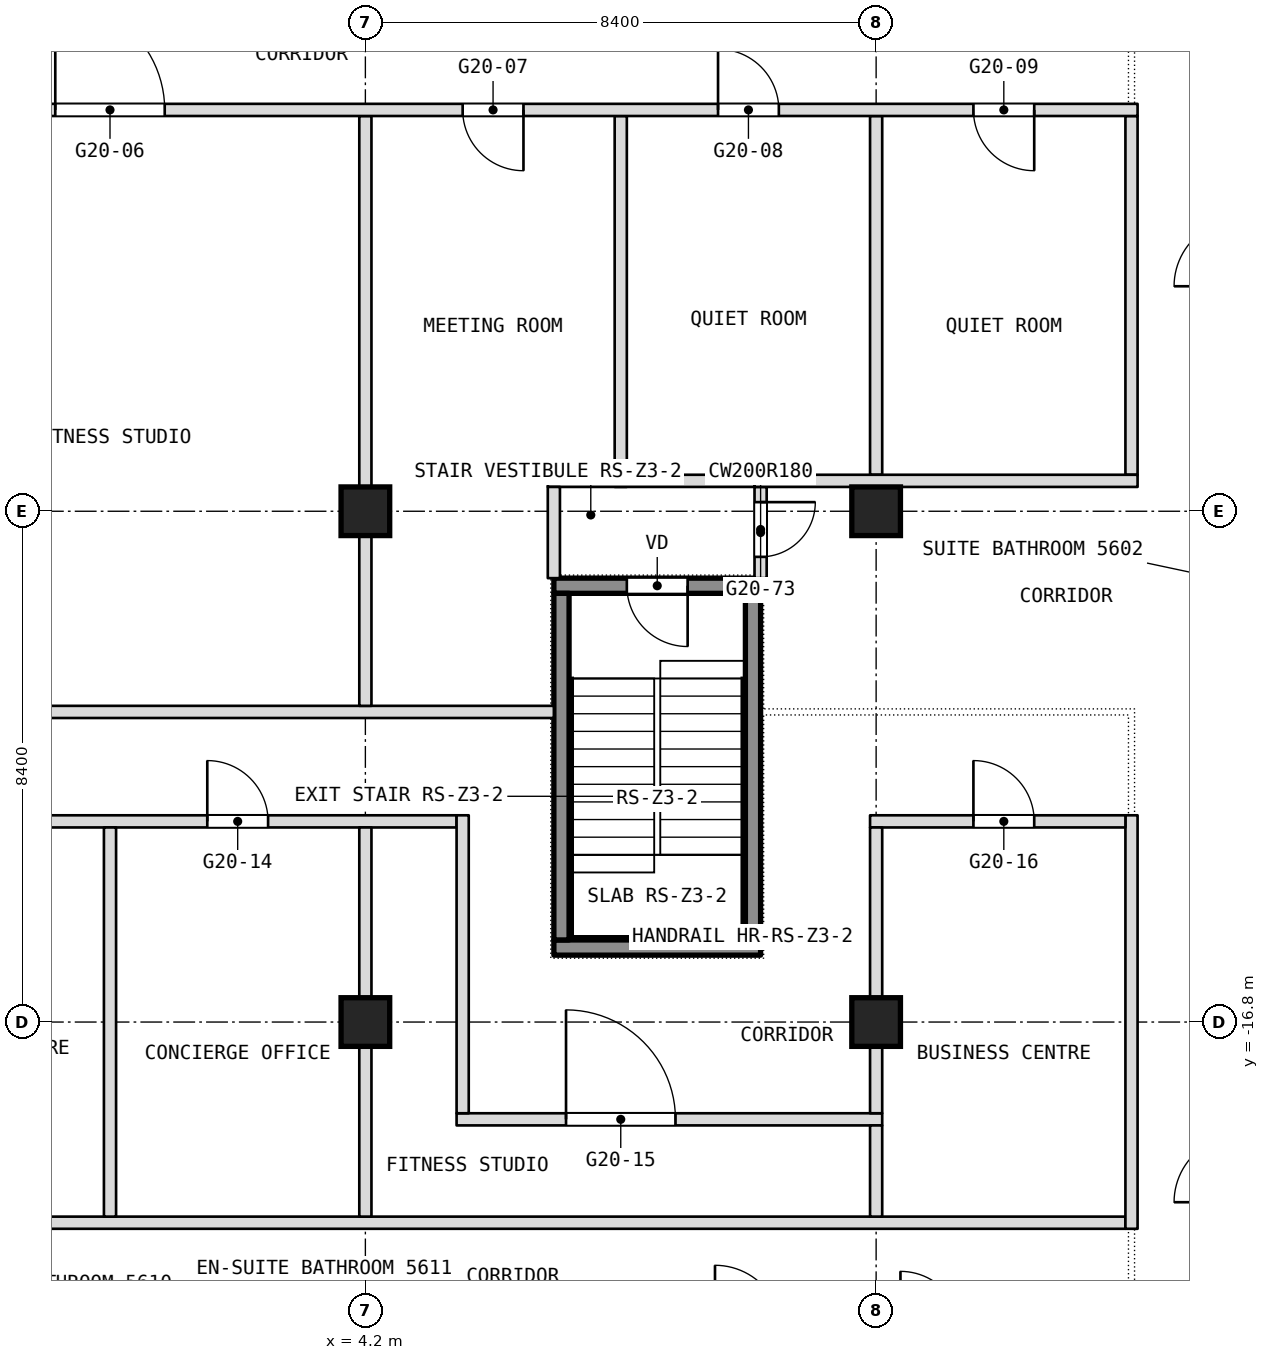
"""IFC4 building model, lengths in metres.
Left out: names, types, materials, properties, quantities, classifications, styles, units other than length and angle.
Written with IfcOpenShell. Run it as: python <this file> out.ifc"""

import sys

from ifc_helpers import new_model, si_unit, direction, frame, frame_2d, origin, origin_2d, place, context, subcontext, project, spatial, rectangle, extrude, element, fill, save


model = new_model("IFC4")
c1 = context("Model", 3, precision=1e-05, world=origin(), true_north=direction((0.0, 1.0)))
c2 = subcontext(c1, "Body", "Model", "MODEL_VIEW")
j1 = project(units=[si_unit("LENGTHUNIT", "METRE"), si_unit("PLANEANGLEUNIT", "RADIAN")], contexts=[c1])
p1 = place(None, origin())
s1 = spatial("IfcSite", under=j1, at=p1, CompositionType="ELEMENT")
p2 = place(p1, origin())
s2 = spatial("IfcBuilding", under=s1, at=p2, CompositionType="ELEMENT")
p3 = place(p2, frame((0.0, 0.0, 238.1)))
s3 = spatial("IfcBuildingStorey", under=s2, at=p3, CompositionType="ELEMENT", Elevation=238.1)
for number, where, z_axis, x_axis in (
    (1, (4.2, -16.8, 0.0), (0.0, 0.0, 1.0), (1.0, 0.0, 0.0)),
    (2, (4.2, -8.4, 0.0), (0.0, 0.0, 1.0), (1.0, 0.0, 0.0)),
    (3, (12.6, -16.8, 0.0), (0.0, 0.0, 1.0), (1.0, 0.0, 0.0)),
    (4, (12.6, -8.4, 0.0), (0.0, 0.0, 1.0), (1.0, 0.0, 0.0)),
):
    element("IfcColumn", number, at=place(p3, frame(where, z_axis=z_axis, x_axis=x_axis)), inside=s3, PredefinedType="COLUMN", context=c2, shape_type="SweptSolid", body=[
        extrude(rectangle(XDim=0.8, YDim=0.8, at=origin_2d()), origin(), (0.0, 0.0, 1.0), 3.6),
    ])
p4 = place(p3, frame((-16.7, -20.1, 0.0), z_axis=(0.0, 0.0, 1.0), x_axis=(1.0, 0.0, 0.0)))
e5 = element("IfcWall", 5, at=p4, inside=s3, PredefinedType="PARTITIONING", context=c2, shape_type="SweptSolid", body=[
    extrude(rectangle(XDim=33.4, YDim=0.2, at=frame_2d((16.7, 0.0))), origin(), (0.0, 0.0, 1.0), 3.34),
])
p5 = place(p3, frame((5.7, -18.4, 0.0), z_axis=(0.0, 0.0, 1.0), x_axis=(1.0, 0.0, 0.0)))
e6 = element("IfcWall", 6, at=p5, inside=s3, PredefinedType="PARTITIONING", context=c2, shape_type="SweptSolid", body=[
    extrude(rectangle(XDim=7.0, YDim=0.2, at=frame_2d((3.5, 0.0))), origin(), (0.0, 0.0, 1.0), 3.34),
])
p6 = place(p5, frame((1.8, 0.0, 0.0)))
e7 = element("IfcOpeningElement", 7, at=p6, cuts=e6, PredefinedType="OPENING", context=c2, shape_type="SweptSolid", body=[
    extrude(rectangle(XDim=1.8, YDim=2.1, at=frame_2d((0.9, 1.05))), frame((0.0, 0.1, 0.0), z_axis=(0.0, -1.0, 0.0), x_axis=(1.0, 0.0, 0.0)), (0.0, 0.0, 1.0), 0.2),
])
p7 = place(p3, frame((16.8, -20.2, 0.0), z_axis=(0.0, 0.0, 1.0), x_axis=(0.0, 1.0, 0.0)))
e8 = element("IfcWall", 8, at=p7, inside=s3, PredefinedType="PARTITIONING", context=c2, shape_type="SweptSolid", body=[
    extrude(rectangle(XDim=6.8, YDim=0.2, at=frame_2d((3.4, 0.0))), origin(), (0.0, 0.0, 1.0), 3.34),
])
p8 = place(p3, frame((16.8, -7.8, 0.0), z_axis=(0.0, 0.0, 1.0), x_axis=(0.0, 1.0, 0.0)))
e9 = element("IfcWall", 9, at=p8, inside=s3, PredefinedType="PARTITIONING", context=c2, shape_type="SweptSolid", body=[
    extrude(rectangle(XDim=5.9, YDim=0.2, at=frame_2d((2.95, 0.0))), origin(), (0.0, 0.0, 1.0), 3.34),
])
p9 = place(p3, frame((-5.9, -13.5, 0.0), z_axis=(0.0, 0.0, 1.0), x_axis=(1.0, 0.0, 0.0)))
e10 = element("IfcWall", 10, at=p9, inside=s3, PredefinedType="PARTITIONING", context=c2, shape_type="SweptSolid", body=[
    extrude(rectangle(XDim=11.6, YDim=0.2, at=frame_2d((5.8, 0.0))), origin(), (0.0, 0.0, 1.0), 3.34),
])
p10 = place(p9, frame((3.3, 0.0, 0.0)))
e11 = element("IfcOpeningElement", 11, at=p10, cuts=e10, PredefinedType="OPENING", context=c2, shape_type="SweptSolid", body=[
    extrude(rectangle(XDim=1.0, YDim=2.1, at=frame_2d((0.5, 1.05))), frame((0.0, 0.1, 0.0), z_axis=(0.0, -1.0, 0.0), x_axis=(1.0, 0.0, 0.0)), (0.0, 0.0, 1.0), 0.2),
])
p11 = place(p9, frame((7.5, 0.0, 0.0)))
e12 = element("IfcOpeningElement", 12, at=p11, cuts=e10, PredefinedType="OPENING", context=c2, shape_type="SweptSolid", body=[
    extrude(rectangle(XDim=1.0, YDim=2.1, at=frame_2d((0.5, 1.05))), frame((0.0, 0.1, 0.0), z_axis=(0.0, -1.0, 0.0), x_axis=(1.0, 0.0, 0.0)), (0.0, 0.0, 1.0), 0.2),
])
p12 = place(p3, frame((12.5, -13.5, 0.0), z_axis=(0.0, 0.0, 1.0), x_axis=(1.0, 0.0, 0.0)))
e13 = element("IfcWall", 13, at=p12, inside=s3, PredefinedType="PARTITIONING", context=c2, shape_type="SweptSolid", body=[
    extrude(rectangle(XDim=4.2, YDim=0.2, at=frame_2d((2.1, 0.0))), origin(), (0.0, 0.0, 1.0), 3.34),
])
p13 = place(p12, frame((1.7, 0.0, 0.0)))
e14 = element("IfcOpeningElement", 14, at=p13, cuts=e13, PredefinedType="OPENING", context=c2, shape_type="SweptSolid", body=[
    extrude(rectangle(XDim=1.0, YDim=2.1, at=frame_2d((0.5, 1.05))), frame((0.0, 0.1, 0.0), z_axis=(0.0, -1.0, 0.0), x_axis=(1.0, 0.0, 0.0)), (0.0, 0.0, 1.0), 0.2),
])
p14 = place(p3, frame((12.6, -20.0, 0.0), z_axis=(0.0, 0.0, 1.0), x_axis=(0.0, 1.0, 0.0)))
e15 = element("IfcWall", 15, at=p14, inside=s3, PredefinedType="PARTITIONING", context=c2, shape_type="SweptSolid", body=[
    extrude(rectangle(XDim=1.5, YDim=0.2, at=frame_2d((0.75, 0.0))), origin(), (0.0, 0.0, 1.0), 3.34),
])
p15 = place(p3, frame((12.6, -7.8, 0.0), z_axis=(0.0, 0.0, 1.0), x_axis=(0.0, 1.0, 0.0)))
e16 = element("IfcWall", 16, at=p15, inside=s3, PredefinedType="PARTITIONING", context=c2, shape_type="SweptSolid", body=[
    extrude(rectangle(XDim=5.9, YDim=0.2, at=frame_2d((2.95, 0.0))), origin(), (0.0, 0.0, 1.0), 3.34),
])
p16 = place(p3, frame((12.6, -18.3, 0.0), z_axis=(0.0, 0.0, 1.0), x_axis=(0.0, 1.0, 0.0)))
e17 = element("IfcWall", 17, at=p16, inside=s3, PredefinedType="PARTITIONING", context=c2, shape_type="SweptSolid", body=[
    extrude(rectangle(XDim=4.7, YDim=0.2, at=frame_2d((2.35, 0.0))), origin(), (0.0, 0.0, 1.0), 3.34),
])
p17 = place(p3, frame((-7.3, -11.7, 0.0), z_axis=(0.0, 0.0, 1.0), x_axis=(1.0, 0.0, 0.0)))
e18 = element("IfcWall", 18, at=p17, inside=s3, PredefinedType="PARTITIONING", context=c2, shape_type="SweptSolid", body=[
    extrude(rectangle(XDim=14.6, YDim=0.2, at=frame_2d((7.3, 0.0))), origin(), (0.0, 0.0, 1.0), 3.34),
])
p18 = place(p3, frame((10.7, -9.5, 0.0), z_axis=(0.0, 0.0, 1.0), x_axis=(0.0, 1.0, 0.0)))
e19 = element("IfcWall", 19, at=p18, inside=s3, PredefinedType="PARTITIONING", context=c2, shape_type="SweptSolid", body=[
    extrude(rectangle(XDim=1.5, YDim=0.2, at=frame_2d((0.75, 0.0))), origin(), (0.0, 0.0, 1.0), 3.34),
])
p19 = place(p18, frame((0.35, 0.0, 0.0)))
e20 = element("IfcOpeningElement", 20, at=p19, cuts=e19, PredefinedType="OPENING", context=c2, shape_type="SweptSolid", body=[
    extrude(rectangle(XDim=0.9, YDim=2.1, at=frame_2d((0.45, 1.05))), frame((0.0, 0.1, 0.0), z_axis=(0.0, -1.0, 0.0), x_axis=(1.0, 0.0, 0.0)), (0.0, 0.0, 1.0), 0.2),
])
p20 = place(p3, frame((8.4, -8.0, 0.0), z_axis=(0.0, 0.0, 1.0), x_axis=(0.0, 1.0, 0.0)))
e21 = element("IfcWall", 21, at=p20, inside=s3, PredefinedType="PARTITIONING", context=c2, shape_type="SweptSolid", body=[
    extrude(rectangle(XDim=6.1, YDim=0.2, at=frame_2d((3.05, 0.0))), origin(), (0.0, 0.0, 1.0), 3.34),
])
p21 = place(p3, frame((10.6, -7.9, 0.0), z_axis=(0.0, 0.0, 1.0), x_axis=(1.0, 0.0, 0.0)))
e22 = element("IfcWall", 22, at=p21, inside=s3, PredefinedType="PARTITIONING", context=c2, shape_type="SweptSolid", body=[
    extrude(rectangle(XDim=6.3, YDim=0.2, at=frame_2d((3.15, 0.0))), origin(), (0.0, 0.0, 1.0), 3.34),
])
p22 = place(p3, frame((7.2, -7.9, 0.0), z_axis=(0.0, 0.0, 1.0), x_axis=(1.0, 0.0, 0.0)))
e23 = element("IfcWall", 23, at=p22, inside=s3, PredefinedType="PARTITIONING", context=c2, shape_type="SweptSolid", body=[
    extrude(rectangle(XDim=3.4, YDim=0.2, at=frame_2d((1.7, 0.0))), origin(), (0.0, 0.0, 1.0), 3.34),
])
p23 = place(p3, frame((7.3, -9.5, 0.0), z_axis=(0.0, 0.0, 1.0), x_axis=(0.0, 1.0, 0.0)))
e24 = element("IfcWall", 24, at=p23, inside=s3, PredefinedType="PARTITIONING", context=c2, shape_type="SweptSolid", body=[
    extrude(rectangle(XDim=1.5, YDim=0.2, at=frame_2d((0.75, 0.0))), origin(), (0.0, 0.0, 1.0), 3.34),
])
p24 = place(p3, frame((5.8, -18.3, 0.0), z_axis=(0.0, 0.0, 1.0), x_axis=(0.0, 1.0, 0.0)))
e25 = element("IfcWall", 25, at=p24, inside=s3, PredefinedType="PARTITIONING", context=c2, shape_type="SweptSolid", body=[
    extrude(rectangle(XDim=4.9, YDim=0.2, at=frame_2d((2.45, 0.0))), origin(), (0.0, 0.0, 1.0), 3.34),
])
p25 = place(p3, frame((4.2, -20.0, 0.0), z_axis=(0.0, 0.0, 1.0), x_axis=(0.0, 1.0, 0.0)))
e26 = element("IfcWall", 26, at=p25, inside=s3, PredefinedType="PARTITIONING", context=c2, shape_type="SweptSolid", body=[
    extrude(rectangle(XDim=6.4, YDim=0.2, at=frame_2d((3.2, 0.0))), origin(), (0.0, 0.0, 1.0), 3.34),
])
p26 = place(p3, frame((4.2, -11.6, 0.0), z_axis=(0.0, 0.0, 1.0), x_axis=(0.0, 1.0, 0.0)))
e27 = element("IfcWall", 27, at=p26, inside=s3, PredefinedType="PARTITIONING", context=c2, shape_type="SweptSolid", body=[
    extrude(rectangle(XDim=9.7, YDim=0.2, at=frame_2d((4.85, 0.0))), origin(), (0.0, 0.0, 1.0), 3.34),
])
p27 = place(p3, frame((-16.9, -1.8, 0.0), z_axis=(0.0, 0.0, 1.0), x_axis=(1.0, 0.0, 0.0)))
e28 = element("IfcWall", 28, at=p27, inside=s3, PredefinedType="PARTITIONING", context=c2, shape_type="SweptSolid", body=[
    extrude(rectangle(XDim=33.8, YDim=0.2, at=frame_2d((16.9, 0.0))), origin(), (0.0, 0.0, 1.0), 3.34),
])
p28 = place(p27, frame((1.7, 0.0, 0.0)))
e29 = element("IfcOpeningElement", 29, at=p28, cuts=e28, PredefinedType="OPENING", context=c2, shape_type="SweptSolid", body=[
    extrude(rectangle(XDim=1.0, YDim=2.1, at=frame_2d((0.5, 1.05))), frame((0.0, 0.1, 0.0), z_axis=(0.0, -1.0, 0.0), x_axis=(1.0, 0.0, 0.0)), (0.0, 0.0, 1.0), 0.2),
])
p29 = place(p27, frame((5.9, 0.0, 0.0)))
e30 = element("IfcOpeningElement", 30, at=p29, cuts=e28, PredefinedType="OPENING", context=c2, shape_type="SweptSolid", body=[
    extrude(rectangle(XDim=1.0, YDim=2.1, at=frame_2d((0.5, 1.05))), frame((0.0, 0.1, 0.0), z_axis=(0.0, -1.0, 0.0), x_axis=(1.0, 0.0, 0.0)), (0.0, 0.0, 1.0), 0.2),
])
p30 = place(p27, frame((10.1, 0.0, 0.0)))
e31 = element("IfcOpeningElement", 31, at=p30, cuts=e28, PredefinedType="OPENING", context=c2, shape_type="SweptSolid", body=[
    extrude(rectangle(XDim=1.0, YDim=2.1, at=frame_2d((0.5, 1.05))), frame((0.0, 0.1, 0.0), z_axis=(0.0, -1.0, 0.0), x_axis=(1.0, 0.0, 0.0)), (0.0, 0.0, 1.0), 0.2),
])
p31 = place(p27, frame((16.0, 0.0, 0.0)))
e32 = element("IfcOpeningElement", 32, at=p31, cuts=e28, PredefinedType="OPENING", context=c2, shape_type="SweptSolid", body=[
    extrude(rectangle(XDim=1.8, YDim=2.1, at=frame_2d((0.9, 1.05))), frame((0.0, 0.1, 0.0), z_axis=(0.0, -1.0, 0.0), x_axis=(1.0, 0.0, 0.0)), (0.0, 0.0, 1.0), 0.2),
])
p32 = place(p27, frame((22.7, 0.0, 0.0)))
e33 = element("IfcOpeningElement", 33, at=p32, cuts=e28, PredefinedType="OPENING", context=c2, shape_type="SweptSolid", body=[
    extrude(rectangle(XDim=1.0, YDim=2.1, at=frame_2d((0.5, 1.05))), frame((0.0, 0.1, 0.0), z_axis=(0.0, -1.0, 0.0), x_axis=(1.0, 0.0, 0.0)), (0.0, 0.0, 1.0), 0.2),
])
p33 = place(p27, frame((26.9, 0.0, 0.0)))
e34 = element("IfcOpeningElement", 34, at=p33, cuts=e28, PredefinedType="OPENING", context=c2, shape_type="SweptSolid", body=[
    extrude(rectangle(XDim=1.0, YDim=2.1, at=frame_2d((0.5, 1.05))), frame((0.0, 0.1, 0.0), z_axis=(0.0, -1.0, 0.0), x_axis=(1.0, 0.0, 0.0)), (0.0, 0.0, 1.0), 0.2),
])
p34 = place(p27, frame((31.1, 0.0, 0.0)))
e35 = element("IfcOpeningElement", 35, at=p34, cuts=e28, PredefinedType="OPENING", context=c2, shape_type="SweptSolid", body=[
    extrude(rectangle(XDim=1.0, YDim=2.1, at=frame_2d((0.5, 1.05))), frame((0.0, 0.1, 0.0), z_axis=(0.0, -1.0, 0.0), x_axis=(1.0, 0.0, 0.0)), (0.0, 0.0, 1.0), 0.2),
])
p35 = place(p3, frame((0.0, -20.0, 0.0), z_axis=(0.0, 0.0, 1.0), x_axis=(0.0, 1.0, 0.0)))
e36 = element("IfcWall", 36, at=p35, inside=s3, PredefinedType="PARTITIONING", context=c2, shape_type="SweptSolid", body=[
    extrude(rectangle(XDim=6.4, YDim=0.2, at=frame_2d((3.2, 0.0))), origin(), (0.0, 0.0, 1.0), 3.34),
])
p36 = place(p3, frame((7.3, -15.575, 0.1), z_axis=(0.0, 0.0, 1.0), x_axis=(1.0, 0.0, 0.0)))
e37 = element("IfcWall", 37, at=p36, inside=s3, PredefinedType="SHEAR", context=c2, shape_type="SweptSolid", body=[
    extrude(rectangle(XDim=3.4, YDim=0.25, at=frame_2d((1.7, 0.0))), origin(), (0.0, 0.0, 1.0), 3.6),
])
p37 = place(p3, frame((7.3, -9.625, 0.1), z_axis=(0.0, 0.0, 1.0), x_axis=(1.0, 0.0, 0.0)))
e38 = element("IfcWall", 38, at=p37, inside=s3, PredefinedType="SHEAR", context=c2, shape_type="SweptSolid", body=[
    extrude(rectangle(XDim=3.4, YDim=0.25, at=frame_2d((1.7, 0.0))), origin(), (0.0, 0.0, 1.0), 3.6),
])
p38 = place(p37, frame((1.2, 0.0, 0.0)))
e39 = element("IfcOpeningElement", 39, at=p38, cuts=e38, PredefinedType="OPENING", context=c2, shape_type="SweptSolid", body=[
    extrude(rectangle(XDim=1.0, YDim=2.1, at=frame_2d((0.5, 1.05))), frame((0.0, 0.125, 0.0), z_axis=(0.0, -1.0, 0.0), x_axis=(1.0, 0.0, 0.0)), (0.0, 0.0, 1.0), 0.25),
])
for number, where, z_axis, x_axis in (
    (40, (7.425, -15.45, 0.1), (0.0, 0.0, 1.0), (0.0, 1.0, 0.0)),
    (41, (10.575, -15.45, 0.1), (0.0, 0.0, 1.0), (0.0, 1.0, 0.0)),
):
    element("IfcWall", number, at=place(p3, frame(where, z_axis=z_axis, x_axis=x_axis)), inside=s3, PredefinedType="SHEAR", context=c2, shape_type="SweptSolid", body=[
        extrude(rectangle(XDim=5.7, YDim=0.25, at=frame_2d((2.85, 0.0))), origin(), (0.0, 0.0, 1.0), 3.6),
    ])
p39 = place(p6, origin())
e42 = element("IfcDoor", 42, at=p39, inside=s3, OperationType="DOUBLE_DOOR_SINGLE_SWING", PredefinedType="DOOR", context=c2, shape_type="SweptSolid", body=[
    extrude(rectangle(XDim=1.8, YDim=2.1, at=frame_2d((0.9, 1.05))), frame((0.0, 0.025, 0.0), z_axis=(0.0, -1.0, 0.0), x_axis=(1.0, 0.0, 0.0)), (0.0, 0.0, 1.0), 0.05),
])
fill(e7, e42)
p40 = place(p11, origin())
e43 = element("IfcDoor", 43, at=p40, inside=s3, OperationType="SINGLE_SWING_RIGHT", PredefinedType="DOOR", context=c2, shape_type="SweptSolid", body=[
    extrude(rectangle(XDim=1.0, YDim=2.1, at=frame_2d((0.5, 1.05))), frame((0.0, 0.025, 0.0), z_axis=(0.0, -1.0, 0.0), x_axis=(1.0, 0.0, 0.0)), (0.0, 0.0, 1.0), 0.05),
])
fill(e12, e43)
p41 = place(p13, origin())
e44 = element("IfcDoor", 44, at=p41, inside=s3, OperationType="SINGLE_SWING_RIGHT", PredefinedType="DOOR", context=c2, shape_type="SweptSolid", body=[
    extrude(rectangle(XDim=1.0, YDim=2.1, at=frame_2d((0.5, 1.05))), frame((0.0, 0.025, 0.0), z_axis=(0.0, -1.0, 0.0), x_axis=(1.0, 0.0, 0.0)), (0.0, 0.0, 1.0), 0.05),
])
fill(e14, e44)
p42 = place(p19, origin())
e45 = element("IfcDoor", 45, at=p42, inside=s3, OperationType="SINGLE_SWING_RIGHT", PredefinedType="DOOR", context=c2, shape_type="SweptSolid", body=[
    extrude(rectangle(XDim=0.9, YDim=2.1, at=frame_2d((0.45, 1.05))), frame((0.0, 0.025, 0.0), z_axis=(0.0, -1.0, 0.0), x_axis=(1.0, 0.0, 0.0)), (0.0, 0.0, 1.0), 0.05),
])
fill(e20, e45)
p43 = place(p31, origin())
e46 = element("IfcDoor", 46, at=p43, inside=s3, OperationType="DOUBLE_DOOR_SINGLE_SWING", PredefinedType="DOOR", context=c2, shape_type="SweptSolid", body=[
    extrude(rectangle(XDim=1.8, YDim=2.1, at=frame_2d((0.9, 1.05))), frame((0.0, 0.025, 0.0), z_axis=(0.0, -1.0, 0.0), x_axis=(1.0, 0.0, 0.0)), (0.0, 0.0, 1.0), 0.05),
])
fill(e32, e46)
p44 = place(p32, origin())
e47 = element("IfcDoor", 47, at=p44, inside=s3, OperationType="SINGLE_SWING_RIGHT", PredefinedType="DOOR", context=c2, shape_type="SweptSolid", body=[
    extrude(rectangle(XDim=1.0, YDim=2.1, at=frame_2d((0.5, 1.05))), frame((0.0, 0.025, 0.0), z_axis=(0.0, -1.0, 0.0), x_axis=(1.0, 0.0, 0.0)), (0.0, 0.0, 1.0), 0.05),
])
fill(e33, e47)
p45 = place(p33, origin())
e48 = element("IfcDoor", 48, at=p45, inside=s3, OperationType="SINGLE_SWING_LEFT", PredefinedType="DOOR", context=c2, shape_type="SweptSolid", body=[
    extrude(rectangle(XDim=1.0, YDim=2.1, at=frame_2d((0.5, 1.05))), frame((0.0, 0.025, 0.0), z_axis=(0.0, -1.0, 0.0), x_axis=(1.0, 0.0, 0.0)), (0.0, 0.0, 1.0), 0.05),
])
fill(e34, e48)
p46 = place(p34, origin())
e49 = element("IfcDoor", 49, at=p46, inside=s3, OperationType="SINGLE_SWING_RIGHT", PredefinedType="DOOR", context=c2, shape_type="SweptSolid", body=[
    extrude(rectangle(XDim=1.0, YDim=2.1, at=frame_2d((0.5, 1.05))), frame((0.0, 0.025, 0.0), z_axis=(0.0, -1.0, 0.0), x_axis=(1.0, 0.0, 0.0)), (0.0, 0.0, 1.0), 0.05),
])
fill(e35, e49)
p47 = place(p38, origin())
e50 = element("IfcDoor", 50, at=p47, inside=s3, OperationType="SINGLE_SWING_LEFT", PredefinedType="DOOR", context=c2, shape_type="SweptSolid", body=[
    extrude(rectangle(XDim=1.0, YDim=2.1, at=frame_2d((0.5, 1.05))), frame((0.0, 0.025, 0.0), z_axis=(0.0, -1.0, 0.0), x_axis=(1.0, 0.0, 0.0)), (0.0, 0.0, 1.0), 0.05),
])
fill(e39, e50)
save(model, sys.argv[1])
